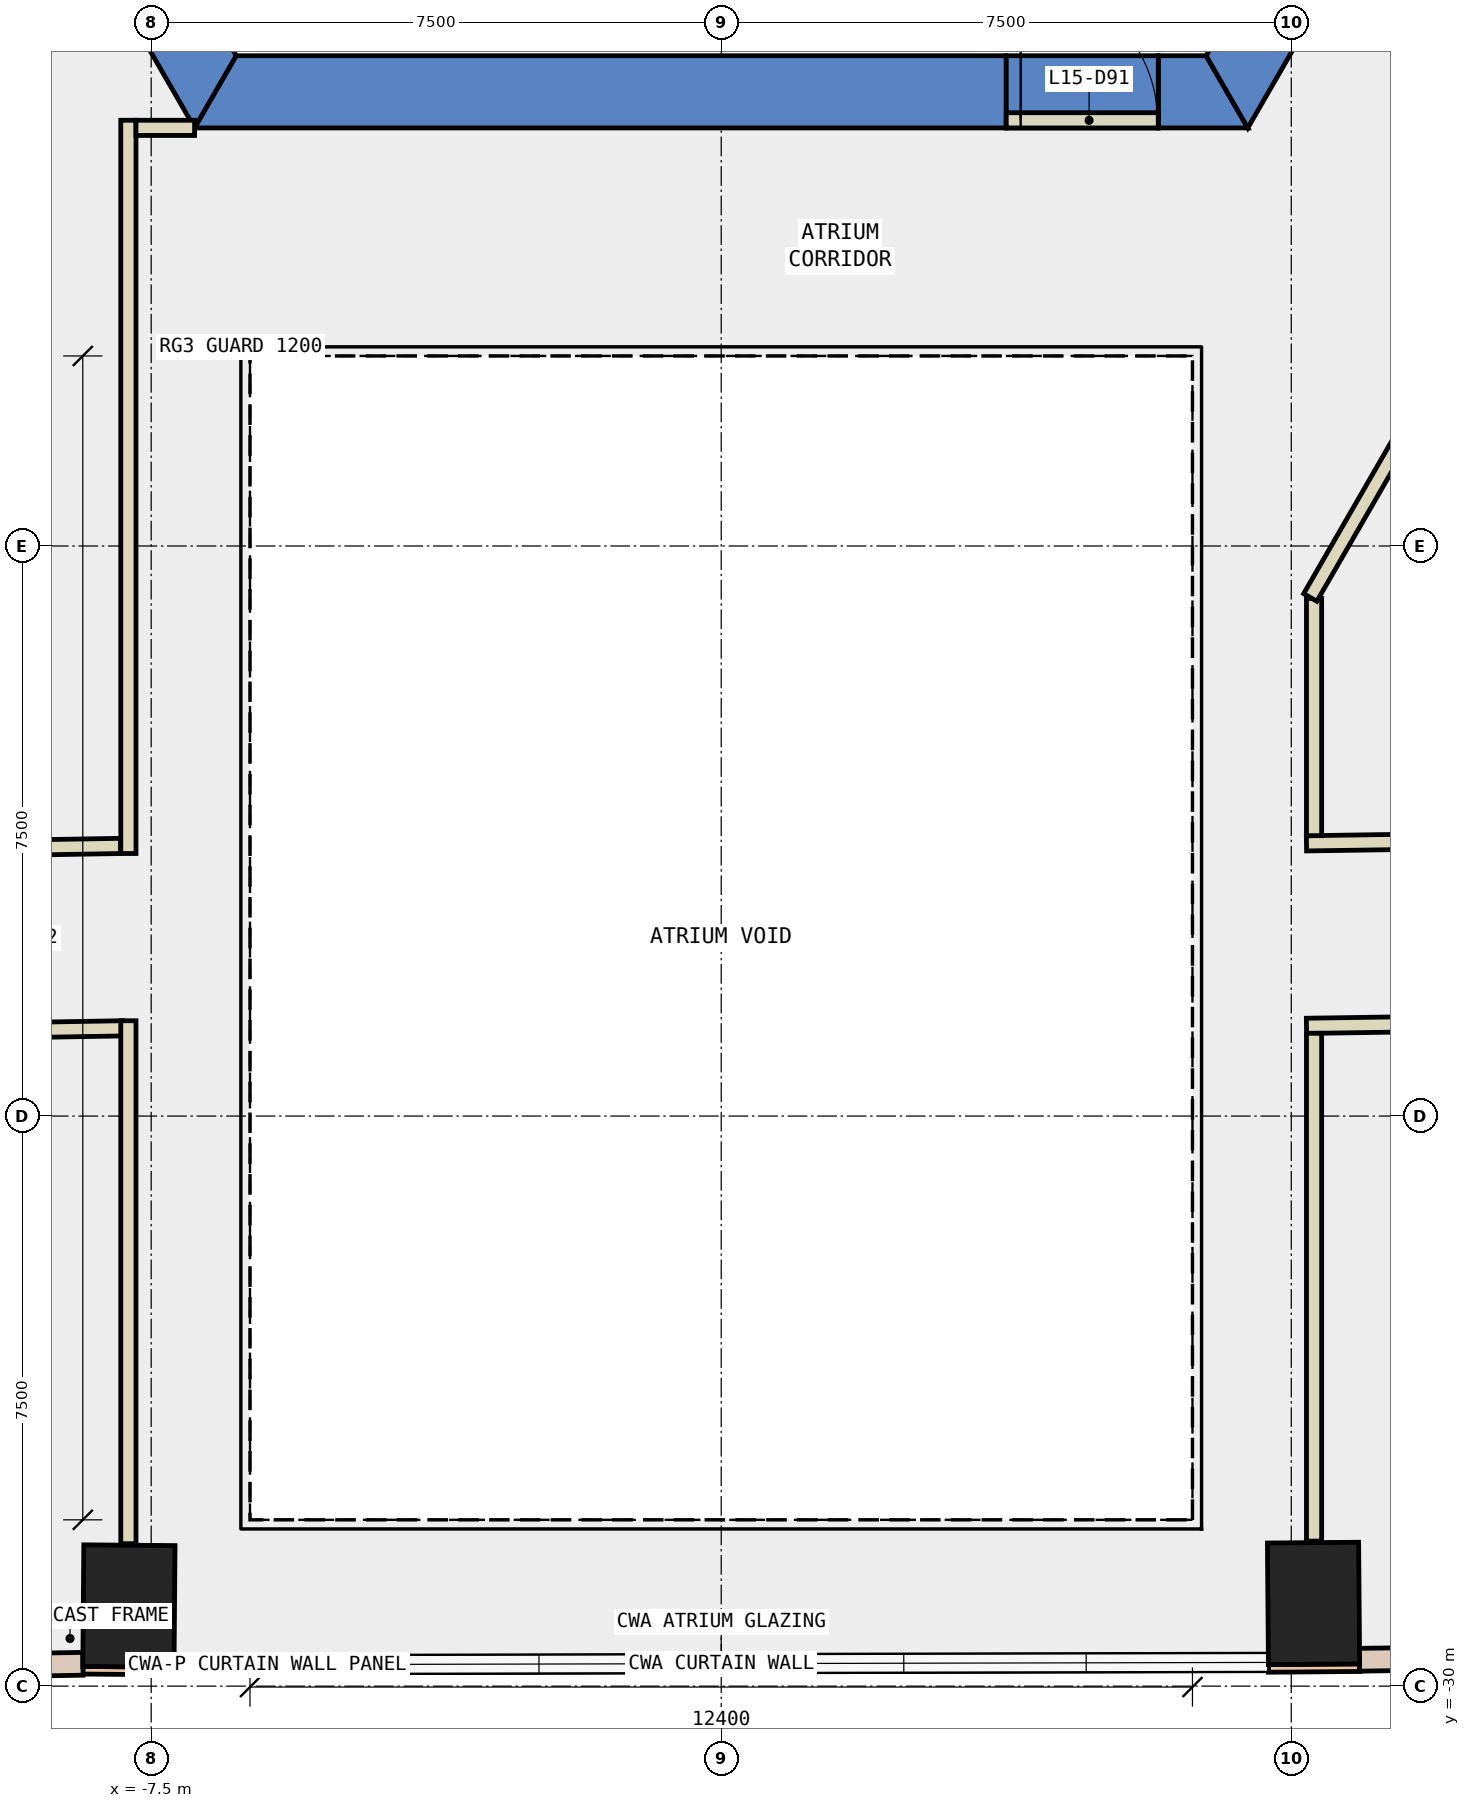
"""IFC4 building model, lengths in metres.
Left out: names, types, materials, properties, quantities, classifications, styles, units other than length and angle.
Written with IfcOpenShell. Run it as: python <this file> out.ifc"""

import sys

from ifc_helpers import new_model, si_unit, direction, frame, frame_2d, origin, origin_2d, place, context, subcontext, project, spatial, polyline, rectangle, outline, extrude, element, fill, save


model = new_model("IFC4")
c1 = context("Model", 3, precision=1e-05, world=origin(), true_north=direction((0.0, 1.0)))
c2 = subcontext(c1, "Body", "Model", "MODEL_VIEW")
j1 = project(units=[si_unit("LENGTHUNIT", "METRE"), si_unit("PLANEANGLEUNIT", "RADIAN")], contexts=[c1])
p1 = place(None, origin())
s1 = spatial("IfcSite", under=j1, at=p1, CompositionType="ELEMENT")
p2 = place(p1, origin())
s2 = spatial("IfcBuilding", under=s1, at=p2, CompositionType="ELEMENT")
p3 = place(p2, frame((0.0, 0.0, 72.8)))
s3 = spatial("IfcBuildingStorey", under=s2, at=p3, CompositionType="ELEMENT", Elevation=72.8)
for number, where, z_axis, x_axis in (
    (1, (-7.793, -28.946, -0.4), (0.0, 0.0, 1.0), (-1.0, 0.008, 0.0)),
    (2, (7.793, -28.912, -0.4), (0.0, 0.0, 1.0), (1.0, 0.008, 0.0)),
):
    element("IfcColumn", number, at=place(p3, frame(where, z_axis=z_axis, x_axis=x_axis)), inside=s3, PredefinedType="COLUMN", context=c2, shape_type="SweptSolid", body=[
        extrude(rectangle(XDim=1.2, YDim=1.6, at=origin_2d()), origin(), (0.0, 0.0, 1.0), 4.2),
    ])
p4 = place(p3, frame((0.0, 0.0, -0.4)))
e3 = element("IfcWall", 3, at=p4, inside=s3, PredefinedType="SHEAR", context=c2, shape_type="SweptSolid", body=[
    extrude(outline(polyline([(-13.856, 2.5), (-6.928, -9.5), (-6.38, -8.55), (-12.759, 2.5), (-13.856, 2.5)])), origin(), (0.0, 0.0, 1.0), 4.2),
])
p5 = place(p3, frame((0.0, 0.0, -0.4)))
e4 = element("IfcWall", 4, at=p5, inside=s3, PredefinedType="SHEAR", context=c2, shape_type="SweptSolid", body=[
    extrude(outline(polyline([(3.75, -9.5), (3.75, -8.55), (-6.38, -8.55), (-6.928, -9.5), (3.75, -9.5)])), origin(), (0.0, 0.0, 1.0), 4.2),
])
p6 = place(p3, frame((0.0, 0.0, -0.4)))
e5 = element("IfcWall", 5, at=p6, inside=s3, PredefinedType="SHEAR", context=c2, shape_type="SweptSolid", body=[
    extrude(outline(polyline([(5.75, -8.55), (5.75, -9.5), (6.928, -9.5), (6.38, -8.55), (5.75, -8.55)])), origin(), (0.0, 0.0, 1.0), 4.2),
])
p7 = place(p3, frame((0.0, 0.0, 3.6)))
e6 = element("IfcWall", 6, at=p7, inside=s3, PredefinedType="SHEAR", context=c2, shape_type="SweptSolid", body=[
    extrude(outline(polyline([(5.75, -9.5), (5.75, -8.55), (3.75, -8.55), (3.75, -9.5), (5.75, -9.5)])), origin(), (0.0, 0.0, 1.0), 0.2),
])
p8 = place(p3, frame((0.0, 0.0, -0.4)))
e7 = element("IfcWall", 7, at=p8, inside=s3, PredefinedType="SHEAR", context=c2, shape_type="SweptSolid", body=[
    extrude(outline(polyline([(8.117, -7.44), (7.295, -6.965), (6.38, -8.55), (6.928, -9.5), (8.117, -7.44)])), origin(), (0.0, 0.0, 1.0), 4.2),
])
for number, where, z_axis, x_axis in (
    (8, (-8.4, -29.791, 0.0), (0.0, 0.0, 1.0), (1.0, -0.008, 0.0)),
    (9, (7.2, -29.767, 0.0), (0.0, 0.0, 1.0), (1.0, 0.008, 0.0)),
):
    element("IfcWall", number, at=place(p3, frame(where, z_axis=z_axis, x_axis=x_axis)), inside=s3, PredefinedType="STANDARD", context=c2, shape_type="SweptSolid", body=[
        extrude(rectangle(XDim=1.2, YDim=0.1, at=frame_2d((0.6, 0.0))), origin(), (0.0, 0.0, 1.0), 3.8),
    ])
p9 = place(p3, frame((-15.567, -29.827, 0.0), z_axis=(0.0, 0.0, 1.0), x_axis=(0.999857944706, 0.0168549817, 0.0)))
e10 = element("IfcWall", 10, at=p9, inside=s3, PredefinedType="STANDARD", context=c2, shape_type="SweptSolid", body=[
    extrude(rectangle(XDim=7.17, YDim=0.3, at=frame_2d((3.585, 0.0))), origin(), (0.0, 0.0, 1.0), 3.8),
])
p10 = place(p9, frame((0.593, 0.0, 0.9)))
e11 = element("IfcOpeningElement", 11, at=p10, cuts=e10, PredefinedType="OPENING", context=c2, shape_type="SweptSolid", body=[
    extrude(rectangle(XDim=2.4, YDim=2.6, at=frame_2d((1.2, 1.3))), frame((0.0, 0.16, 0.0), z_axis=(0.0, -1.0, 0.0), x_axis=(1.0, 0.0, 0.0)), (0.0, 0.0, 1.0), 0.32),
])
p11 = place(p9, frame((4.178, 0.0, 0.9)))
e12 = element("IfcOpeningElement", 12, at=p11, cuts=e10, PredefinedType="OPENING", context=c2, shape_type="SweptSolid", body=[
    extrude(rectangle(XDim=2.4, YDim=2.6, at=frame_2d((1.2, 1.3))), frame((0.0, 0.16, 0.0), z_axis=(0.0, -1.0, 0.0), x_axis=(1.0, 0.0, 0.0)), (0.0, 0.0, 1.0), 0.32),
])
p12 = place(p3, frame((8.398, -29.653, 0.0), z_axis=(0.0, 0.0, 1.0), x_axis=(0.999888301342, 0.014946064363, 0.0)))
e13 = element("IfcWall", 13, at=p12, inside=s3, PredefinedType="STANDARD", context=c2, shape_type="SweptSolid", body=[
    extrude(rectangle(XDim=7.171, YDim=0.3, at=frame_2d((3.585, 0.0))), origin(), (0.0, 0.0, 1.0), 3.8),
])
p13 = place(p12, frame((0.593, 0.0, 0.9)))
e14 = element("IfcOpeningElement", 14, at=p13, cuts=e13, PredefinedType="OPENING", context=c2, shape_type="SweptSolid", body=[
    extrude(rectangle(XDim=2.4, YDim=2.6, at=frame_2d((1.2, 1.3))), frame((0.0, 0.16, 0.0), z_axis=(0.0, -1.0, 0.0), x_axis=(1.0, 0.0, 0.0)), (0.0, 0.0, 1.0), 0.32),
])
p14 = place(p12, frame((4.178, 0.0, 0.9)))
e15 = element("IfcOpeningElement", 15, at=p14, cuts=e13, PredefinedType="OPENING", context=c2, shape_type="SweptSolid", body=[
    extrude(rectangle(XDim=2.4, YDim=2.6, at=frame_2d((1.2, 1.3))), frame((0.0, 0.16, 0.0), z_axis=(0.0, -1.0, 0.0), x_axis=(1.0, 0.0, 0.0)), (0.0, 0.0, 1.0), 0.32),
])
p15 = place(p3, frame((7.7, -18.912, 0.0), z_axis=(0.0, 0.0, 1.0), x_axis=(0.999888819649, 0.014911349423, 0.0)))
e16 = element("IfcWall", 16, at=p15, inside=s3, PredefinedType="PARTITIONING", context=c2, shape_type="SweptSolid", body=[
    extrude(rectangle(XDim=8.252, YDim=0.2, at=frame_2d((4.126, 0.0))), origin(), (0.0, 0.0, 1.0), 3.8),
])
p16 = place(p15, frame((3.626, 0.0, 0.0)))
e17 = element("IfcOpeningElement", 17, at=p16, cuts=e16, PredefinedType="OPENING", context=c2, shape_type="SweptSolid", body=[
    extrude(rectangle(XDim=1.0, YDim=2.1, at=frame_2d((0.5, 1.05))), frame((0.0, 0.11, 0.0), z_axis=(0.0, -1.0, 0.0), x_axis=(1.0, 0.0, 0.0)), (0.0, 0.0, 1.0), 0.22),
])
p17 = place(p3, frame((-16.298, -19.088, 0.0), z_axis=(0.0, 0.0, 1.0), x_axis=(0.999857252997, 0.016895964865, 0.0)))
e18 = element("IfcWall", 18, at=p17, inside=s3, PredefinedType="PARTITIONING", context=c2, shape_type="SweptSolid", body=[
    extrude(rectangle(XDim=8.395, YDim=0.2, at=frame_2d((4.198, 0.0))), origin(), (0.0, 0.0, 1.0), 3.8),
])
p18 = place(p17, frame((3.298, 0.0, 0.0)))
e19 = element("IfcOpeningElement", 19, at=p18, cuts=e18, PredefinedType="OPENING", context=c2, shape_type="SweptSolid", body=[
    extrude(rectangle(XDim=1.8, YDim=2.1, at=frame_2d((0.9, 1.05))), frame((0.0, 0.11, 0.0), z_axis=(0.0, -1.0, 0.0), x_axis=(1.0, 0.0, 0.0)), (0.0, 0.0, 1.0), 0.22),
])
p19 = place(p3, frame((15.999, -21.189, 0.0), z_axis=(0.0, 0.0, 1.0), x_axis=(-0.999888353348, -0.014942584753, 0.0)))
e20 = element("IfcWall", 20, at=p19, inside=s3, PredefinedType="PARTITIONING", context=c2, shape_type="SweptSolid", body=[
    extrude(rectangle(XDim=8.3, YDim=0.2, at=frame_2d((4.15, 0.0))), origin(), (0.0, 0.0, 1.0), 3.8),
])
p20 = place(p19, frame((3.55, 0.0, 0.0)))
e21 = element("IfcOpeningElement", 21, at=p20, cuts=e20, PredefinedType="OPENING", context=c2, shape_type="SweptSolid", body=[
    extrude(rectangle(XDim=1.0, YDim=2.1, at=frame_2d((0.5, 1.05))), frame((0.0, 0.11, 0.0), z_axis=(0.0, -1.0, 0.0), x_axis=(1.0, 0.0, 0.0)), (0.0, 0.0, 1.0), 0.22),
])
p21 = place(p3, frame((-7.881, -21.346, 0.0), z_axis=(0.0, 0.0, 1.0), x_axis=(-0.999857974935, -0.016853188395, 0.0)))
e22 = element("IfcWall", 22, at=p21, inside=s3, PredefinedType="PARTITIONING", context=c2, shape_type="SweptSolid", body=[
    extrude(rectangle(XDim=8.315, YDim=0.2, at=frame_2d((4.158, 0.0))), origin(), (0.0, 0.0, 1.0), 3.8),
])
p22 = place(p21, frame((3.732, 0.0, 0.0)))
e23 = element("IfcOpeningElement", 23, at=p22, cuts=e22, PredefinedType="OPENING", context=c2, shape_type="SweptSolid", body=[
    extrude(rectangle(XDim=1.0, YDim=2.1, at=frame_2d((0.5, 1.05))), frame((0.0, 0.11, 0.0), z_axis=(0.0, -1.0, 0.0), x_axis=(1.0, 0.0, 0.0)), (0.0, 0.0, 1.0), 0.22),
])
p23 = place(p3, frame((7.8, -15.69, 0.0), z_axis=(0.0, 0.0, 1.0), x_axis=(0.0, -1.0, 0.0)))
e24 = element("IfcWall", 24, at=p23, inside=s3, PredefinedType="PARTITIONING", context=c2, shape_type="SweptSolid", body=[
    extrude(rectangle(XDim=3.121, YDim=0.2, at=frame_2d((1.561, 0.0))), origin(), (0.0, 0.0, 1.0), 3.8),
])
p24 = place(p3, frame((-7.8, -19.046, 0.0), z_axis=(0.0, 0.0, 1.0), x_axis=(0.0, 1.0, 0.0)))
e25 = element("IfcWall", 25, at=p24, inside=s3, PredefinedType="PARTITIONING", context=c2, shape_type="SweptSolid", body=[
    extrude(rectangle(XDim=9.647, YDim=0.2, at=frame_2d((4.823, 0.0))), origin(), (0.0, 0.0, 1.0), 3.8),
])
p25 = place(p3, frame((-7.7, -9.499, 0.0), z_axis=(0.0, 0.0, 1.0), x_axis=(1.0, 0.0, 0.0)))
e26 = element("IfcWall", 26, at=p25, inside=s3, PredefinedType="PARTITIONING", context=c2, shape_type="SweptSolid", body=[
    extrude(rectangle(XDim=0.771, YDim=0.2, at=frame_2d((0.385, 0.0))), origin(), (0.0, 0.0, 1.0), 3.8),
])
p26 = place(p3, frame((7.8, -21.411, 0.0), z_axis=(0.0, 0.0, 1.0), x_axis=(0.0, -1.0, 0.0)))
e27 = element("IfcWall", 27, at=p26, inside=s3, PredefinedType="PARTITIONING", context=c2, shape_type="SweptSolid", body=[
    extrude(rectangle(XDim=6.681, YDim=0.2, at=frame_2d((3.341, 0.0))), origin(), (0.0, 0.0, 1.0), 3.8),
])
p27 = place(p3, frame((-7.8, -28.126, 0.0), z_axis=(0.0, 0.0, 1.0), x_axis=(0.0, 1.0, 0.0)))
e28 = element("IfcWall", 28, at=p27, inside=s3, PredefinedType="PARTITIONING", context=c2, shape_type="SweptSolid", body=[
    extrude(rectangle(XDim=6.88, YDim=0.2, at=frame_2d((3.44, 0.0))), origin(), (0.0, 0.0, 1.0), 3.8),
])
p28 = place(p3, frame((12.4, -7.621, 0.0), z_axis=(0.0, 0.0, 1.0), x_axis=(-0.49990497871, -0.866080257402, 0.0)))
e29 = element("IfcWall", 29, at=p28, inside=s3, PredefinedType="PARTITIONING", context=c2, shape_type="SweptSolid", body=[
    extrude(rectangle(XDim=9.302, YDim=0.2, at=frame_2d((4.651, 0.0))), origin(), (0.0, 0.0, 1.0), 3.8),
])
p29 = place(p3, frame((3.75, -9.4, 0.0), z_axis=(0.0, 0.0, 1.0), x_axis=(1.0, 0.0, 0.0)))
e30 = element("IfcWall", 30, at=p29, inside=s3, PredefinedType="PARTITIONING", context=c2, shape_type="SweptSolid", body=[
    extrude(rectangle(XDim=2.0, YDim=0.2, at=frame_2d((1.0, 0.0))), origin(), (0.0, 0.0, 1.0), 2.4),
])
p30 = place(p29, frame((0.19, 0.0, 0.0)))
e31 = element("IfcOpeningElement", 31, at=p30, cuts=e30, PredefinedType="OPENING", context=c2, shape_type="SweptSolid", body=[
    extrude(rectangle(XDim=1.8, YDim=2.1, at=frame_2d((0.9, 1.05))), frame((0.0, 0.11, 0.0), z_axis=(0.0, -1.0, 0.0), x_axis=(1.0, 0.0, 0.0)), (0.0, 0.0, 1.0), 0.22),
])
p31 = place(p30, origin())
e32 = element("IfcDoor", 32, at=p31, inside=s3, OperationType="DOUBLE_DOOR_SINGLE_SWING", PredefinedType="DOOR", context=c2, shape_type="SweptSolid", body=[
    extrude(rectangle(XDim=1.8, YDim=2.1, at=frame_2d((0.9, 1.05))), frame((0.0, 0.025, 0.0), z_axis=(0.0, -1.0, 0.0), x_axis=(1.0, 0.0, 0.0)), (0.0, 0.0, 1.0), 0.05),
])
fill(e31, e32)
save(model, sys.argv[1])
